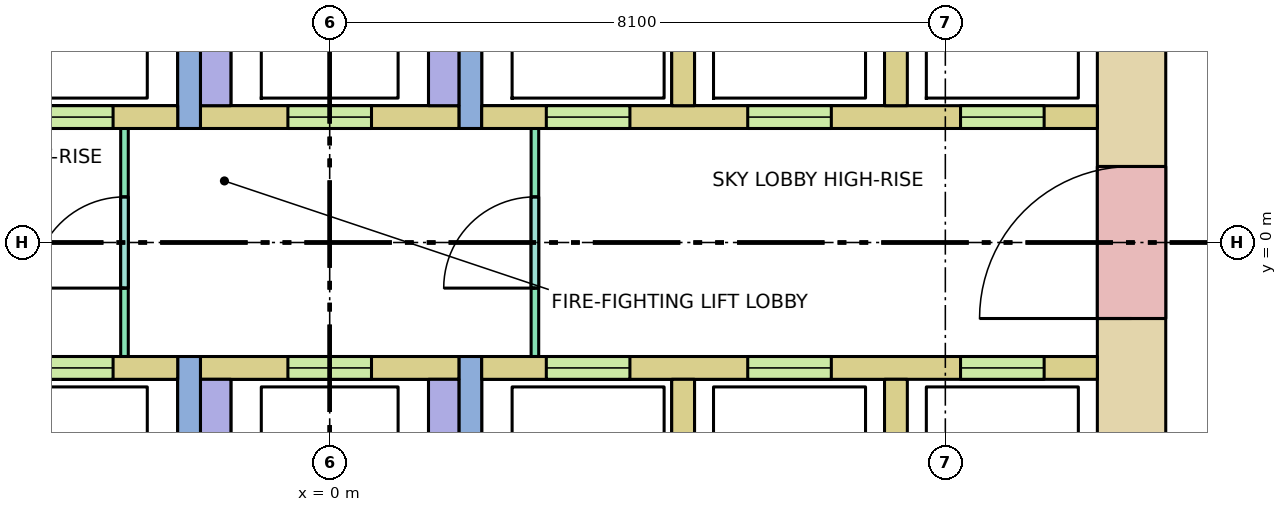
"""IFC4 building model, lengths in metres.
Left out: names, types, materials, properties, quantities, classifications, styles, units other than length and angle.
Written with IfcOpenShell. Run it as: python <this file> out.ifc"""

import sys

from ifc_helpers import new_model, si_unit, direction, frame, frame_2d, origin, place, context, subcontext, project, spatial, rectangle, extrude, element, fill, save


model = new_model("IFC4")
c1 = context("Model", 3, precision=1e-05, world=origin(), true_north=direction((0.0, 1.0)))
c2 = subcontext(c1, "Body", "Model", "MODEL_VIEW")
j1 = project(units=[si_unit("LENGTHUNIT", "METRE"), si_unit("PLANEANGLEUNIT", "RADIAN")], contexts=[c1])
p1 = place(None, origin())
s1 = spatial("IfcSite", under=j1, at=p1, CompositionType="ELEMENT")
p2 = place(p1, origin())
s2 = spatial("IfcBuilding", under=s1, at=p2, CompositionType="ELEMENT")
p3 = place(p2, frame((0.0, 0.0, 146.6)))
s3 = spatial("IfcBuildingStorey", under=s2, at=p3, CompositionType="ELEMENT", Elevation=146.6)
p4 = place(p3, frame((10.55, -5.13, -0.28), z_axis=(0.0, 0.0, 1.0), x_axis=(0.0, 1.0, 0.0)))
e1 = element("IfcWall", 1, at=p4, inside=s3, PredefinedType="SHEAR", context=c2, shape_type="SweptSolid", body=[
    extrude(rectangle(XDim=10.26, YDim=0.9, at=frame_2d((5.13, 0.0))), origin(), (0.0, 0.0, 1.0), 7.6),
])
p5 = place(p4, frame((4.13, 0.0, 0.28)))
e2 = element("IfcOpeningElement", 2, at=p5, cuts=e1, PredefinedType="OPENING", context=c2, shape_type="SweptSolid", body=[
    extrude(rectangle(XDim=2.0, YDim=2.1, at=frame_2d((1.0, 1.05))), frame((0.0, 0.46, 0.0), z_axis=(0.0, -1.0, 0.0), x_axis=(1.0, 0.0, 0.0)), (0.0, 0.0, 1.0), 0.92),
])
p6 = place(p3, frame((-10.1, 1.65, 0.0), z_axis=(0.0, 0.0, 1.0), x_axis=(1.0, 0.0, 0.0)))
e3 = element("IfcWall", 3, at=p6, inside=s3, PredefinedType="SOLIDWALL", context=c2, shape_type="SweptSolid", body=[
    extrude(rectangle(XDim=8.1, YDim=0.3, at=frame_2d((4.05, 0.0))), origin(), (0.0, 0.0, 1.0), 7.32),
])
p7 = place(p6, frame((0.7, 0.0, 0.0)))
e4 = element("IfcOpeningElement", 4, at=p7, cuts=e3, PredefinedType="OPENING", context=c2, shape_type="SweptSolid", body=[
    extrude(rectangle(XDim=1.1, YDim=2.1, at=frame_2d((0.55, 1.05))), frame((0.0, 0.16, 0.0), z_axis=(0.0, -1.0, 0.0), x_axis=(1.0, 0.0, 0.0)), (0.0, 0.0, 1.0), 0.32),
])
p8 = place(p6, frame((3.5, 0.0, 0.0)))
e5 = element("IfcOpeningElement", 5, at=p8, cuts=e3, PredefinedType="OPENING", context=c2, shape_type="SweptSolid", body=[
    extrude(rectangle(XDim=1.1, YDim=2.1, at=frame_2d((0.55, 1.05))), frame((0.0, 0.16, 0.0), z_axis=(0.0, -1.0, 0.0), x_axis=(1.0, 0.0, 0.0)), (0.0, 0.0, 1.0), 0.32),
])
p9 = place(p6, frame((6.15, 0.0, 0.0)))
e6 = element("IfcOpeningElement", 6, at=p9, cuts=e3, PredefinedType="OPENING", context=c2, shape_type="SweptSolid", body=[
    extrude(rectangle(XDim=1.1, YDim=2.1, at=frame_2d((0.55, 1.05))), frame((0.0, 0.16, 0.0), z_axis=(0.0, -1.0, 0.0), x_axis=(1.0, 0.0, 0.0)), (0.0, 0.0, 1.0), 0.32),
])
p10 = place(p3, frame((-10.1, -1.65, 0.0), z_axis=(0.0, 0.0, 1.0), x_axis=(1.0, 0.0, 0.0)))
e7 = element("IfcWall", 7, at=p10, inside=s3, PredefinedType="SOLIDWALL", context=c2, shape_type="SweptSolid", body=[
    extrude(rectangle(XDim=8.1, YDim=0.3, at=frame_2d((4.05, 0.0))), origin(), (0.0, 0.0, 1.0), 7.32),
])
p11 = place(p10, frame((0.7, 0.0, 0.0)))
e8 = element("IfcOpeningElement", 8, at=p11, cuts=e7, PredefinedType="OPENING", context=c2, shape_type="SweptSolid", body=[
    extrude(rectangle(XDim=1.1, YDim=2.1, at=frame_2d((0.55, 1.05))), frame((0.0, 0.16, 0.0), z_axis=(0.0, -1.0, 0.0), x_axis=(1.0, 0.0, 0.0)), (0.0, 0.0, 1.0), 0.32),
])
p12 = place(p10, frame((3.5, 0.0, 0.0)))
e9 = element("IfcOpeningElement", 9, at=p12, cuts=e7, PredefinedType="OPENING", context=c2, shape_type="SweptSolid", body=[
    extrude(rectangle(XDim=1.1, YDim=2.1, at=frame_2d((0.55, 1.05))), frame((0.0, 0.16, 0.0), z_axis=(0.0, -1.0, 0.0), x_axis=(1.0, 0.0, 0.0)), (0.0, 0.0, 1.0), 0.32),
])
p13 = place(p10, frame((6.15, 0.0, 0.0)))
e10 = element("IfcOpeningElement", 10, at=p13, cuts=e7, PredefinedType="OPENING", context=c2, shape_type="SweptSolid", body=[
    extrude(rectangle(XDim=1.1, YDim=2.1, at=frame_2d((0.55, 1.05))), frame((0.0, 0.16, 0.0), z_axis=(0.0, -1.0, 0.0), x_axis=(1.0, 0.0, 0.0)), (0.0, 0.0, 1.0), 0.32),
])
p14 = place(p3, frame((2.0, 1.65, 0.0), z_axis=(0.0, 0.0, 1.0), x_axis=(1.0, 0.0, 0.0)))
e11 = element("IfcWall", 11, at=p14, inside=s3, PredefinedType="SOLIDWALL", context=c2, shape_type="SweptSolid", body=[
    extrude(rectangle(XDim=8.1, YDim=0.3, at=frame_2d((4.05, 0.0))), origin(), (0.0, 0.0, 1.0), 7.32),
])
p15 = place(p14, frame((0.85, 0.0, 0.0)))
e12 = element("IfcOpeningElement", 12, at=p15, cuts=e11, PredefinedType="OPENING", context=c2, shape_type="SweptSolid", body=[
    extrude(rectangle(XDim=1.1, YDim=2.1, at=frame_2d((0.55, 1.05))), frame((0.0, 0.16, 0.0), z_axis=(0.0, -1.0, 0.0), x_axis=(1.0, 0.0, 0.0)), (0.0, 0.0, 1.0), 0.32),
])
p16 = place(p14, frame((3.5, 0.0, 0.0)))
e13 = element("IfcOpeningElement", 13, at=p16, cuts=e11, PredefinedType="OPENING", context=c2, shape_type="SweptSolid", body=[
    extrude(rectangle(XDim=1.1, YDim=2.1, at=frame_2d((0.55, 1.05))), frame((0.0, 0.16, 0.0), z_axis=(0.0, -1.0, 0.0), x_axis=(1.0, 0.0, 0.0)), (0.0, 0.0, 1.0), 0.32),
])
p17 = place(p14, frame((6.3, 0.0, 0.0)))
e14 = element("IfcOpeningElement", 14, at=p17, cuts=e11, PredefinedType="OPENING", context=c2, shape_type="SweptSolid", body=[
    extrude(rectangle(XDim=1.1, YDim=2.1, at=frame_2d((0.55, 1.05))), frame((0.0, 0.16, 0.0), z_axis=(0.0, -1.0, 0.0), x_axis=(1.0, 0.0, 0.0)), (0.0, 0.0, 1.0), 0.32),
])
p18 = place(p3, frame((2.0, -1.65, 0.0), z_axis=(0.0, 0.0, 1.0), x_axis=(1.0, 0.0, 0.0)))
e15 = element("IfcWall", 15, at=p18, inside=s3, PredefinedType="SOLIDWALL", context=c2, shape_type="SweptSolid", body=[
    extrude(rectangle(XDim=8.1, YDim=0.3, at=frame_2d((4.05, 0.0))), origin(), (0.0, 0.0, 1.0), 7.32),
])
p19 = place(p18, frame((0.85, 0.0, 0.0)))
e16 = element("IfcOpeningElement", 16, at=p19, cuts=e15, PredefinedType="OPENING", context=c2, shape_type="SweptSolid", body=[
    extrude(rectangle(XDim=1.1, YDim=2.1, at=frame_2d((0.55, 1.05))), frame((0.0, 0.16, 0.0), z_axis=(0.0, -1.0, 0.0), x_axis=(1.0, 0.0, 0.0)), (0.0, 0.0, 1.0), 0.32),
])
p20 = place(p18, frame((3.5, 0.0, 0.0)))
e17 = element("IfcOpeningElement", 17, at=p20, cuts=e15, PredefinedType="OPENING", context=c2, shape_type="SweptSolid", body=[
    extrude(rectangle(XDim=1.1, YDim=2.1, at=frame_2d((0.55, 1.05))), frame((0.0, 0.16, 0.0), z_axis=(0.0, -1.0, 0.0), x_axis=(1.0, 0.0, 0.0)), (0.0, 0.0, 1.0), 0.32),
])
p21 = place(p18, frame((6.3, 0.0, 0.0)))
e18 = element("IfcOpeningElement", 18, at=p21, cuts=e15, PredefinedType="OPENING", context=c2, shape_type="SweptSolid", body=[
    extrude(rectangle(XDim=1.1, YDim=2.1, at=frame_2d((0.55, 1.05))), frame((0.0, 0.16, 0.0), z_axis=(0.0, -1.0, 0.0), x_axis=(1.0, 0.0, 0.0)), (0.0, 0.0, 1.0), 0.32),
])
for number, where, z_axis, x_axis in (
    (19, (4.65, 1.8, 0.0), (0.0, 0.0, 1.0), (0.0, 1.0, 0.0)),
    (20, (4.65, -4.2, 0.0), (0.0, 0.0, 1.0), (0.0, 1.0, 0.0)),
    (21, (7.45, 1.8, 0.0), (0.0, 0.0, 1.0), (0.0, 1.0, 0.0)),
    (22, (7.45, -4.2, 0.0), (0.0, 0.0, 1.0), (0.0, 1.0, 0.0)),
):
    element("IfcWall", number, at=place(p3, frame(where, z_axis=z_axis, x_axis=x_axis)), inside=s3, PredefinedType="SOLIDWALL", context=c2, shape_type="SweptSolid", body=[
        extrude(rectangle(XDim=2.4, YDim=0.3, at=frame_2d((1.2, 0.0))), origin(), (0.0, 0.0, 1.0), 7.32),
    ])
for number, where, z_axis, x_axis in (
    (23, (-1.85, 1.5, 0.0), (0.0, 0.0, 1.0), (0.0, 1.0, 0.0)),
    (24, (-1.85, -8.1, 0.0), (0.0, 0.0, 1.0), (0.0, 1.0, 0.0)),
    (25, (1.85, 1.5, 0.0), (0.0, 0.0, 1.0), (0.0, 1.0, 0.0)),
    (26, (1.85, -8.1, 0.0), (0.0, 0.0, 1.0), (0.0, 1.0, 0.0)),
):
    element("IfcWall", number, at=place(p3, frame(where, z_axis=z_axis, x_axis=x_axis)), inside=s3, PredefinedType="SHEAR", context=c2, shape_type="SweptSolid", body=[
        extrude(rectangle(XDim=6.6, YDim=0.3, at=frame_2d((3.3, 0.0))), origin(), (0.0, 0.0, 1.0), 7.32),
    ])
p22 = place(p3, frame((-1.7, 1.65, 0.0), z_axis=(0.0, 0.0, 1.0), x_axis=(1.0, 0.0, 0.0)))
e27 = element("IfcWall", 27, at=p22, inside=s3, PredefinedType="SOLIDWALL", context=c2, shape_type="SweptSolid", body=[
    extrude(rectangle(XDim=3.4, YDim=0.3, at=frame_2d((1.7, 0.0))), origin(), (0.0, 0.0, 1.0), 7.32),
])
p23 = place(p22, frame((1.15, 0.0, 0.0)))
e28 = element("IfcOpeningElement", 28, at=p23, cuts=e27, PredefinedType="OPENING", context=c2, shape_type="SweptSolid", body=[
    extrude(rectangle(XDim=1.1, YDim=2.1, at=frame_2d((0.55, 1.05))), frame((0.0, 0.16, 0.0), z_axis=(0.0, -1.0, 0.0), x_axis=(1.0, 0.0, 0.0)), (0.0, 0.0, 1.0), 0.32),
])
p24 = place(p3, frame((-1.7, -1.65, 0.0), z_axis=(0.0, 0.0, 1.0), x_axis=(1.0, 0.0, 0.0)))
e29 = element("IfcWall", 29, at=p24, inside=s3, PredefinedType="SOLIDWALL", context=c2, shape_type="SweptSolid", body=[
    extrude(rectangle(XDim=3.4, YDim=0.3, at=frame_2d((1.7, 0.0))), origin(), (0.0, 0.0, 1.0), 7.32),
])
p25 = place(p24, frame((1.15, 0.0, 0.0)))
e30 = element("IfcOpeningElement", 30, at=p25, cuts=e29, PredefinedType="OPENING", context=c2, shape_type="SweptSolid", body=[
    extrude(rectangle(XDim=1.1, YDim=2.1, at=frame_2d((0.55, 1.05))), frame((0.0, 0.16, 0.0), z_axis=(0.0, -1.0, 0.0), x_axis=(1.0, 0.0, 0.0)), (0.0, 0.0, 1.0), 0.32),
])
for number, where, z_axis, x_axis in (
    (31, (-1.5, 1.8, 0.0), (0.0, 0.0, 1.0), (0.0, 1.0, 0.0)),
    (32, (-1.5, -4.8, 0.0), (0.0, 0.0, 1.0), (0.0, 1.0, 0.0)),
    (33, (1.5, 1.8, 0.0), (0.0, 0.0, 1.0), (0.0, 1.0, 0.0)),
    (34, (1.5, -4.8, 0.0), (0.0, 0.0, 1.0), (0.0, 1.0, 0.0)),
):
    element("IfcWall", number, at=place(p3, frame(where, z_axis=z_axis, x_axis=x_axis)), inside=s3, PredefinedType="SOLIDWALL", context=c2, shape_type="SweptSolid", body=[
        extrude(rectangle(XDim=3.0, YDim=0.4, at=frame_2d((1.5, 0.0))), origin(), (0.0, 0.0, 1.0), 7.32),
    ])
p26 = place(p3, frame((-2.7, -1.5, 0.0), z_axis=(0.0, 0.0, 1.0), x_axis=(0.0, 1.0, 0.0)))
e35 = element("IfcWall", 35, at=p26, inside=s3, PredefinedType="PARTITIONING", context=c2, shape_type="SweptSolid", body=[
    extrude(rectangle(XDim=3.0, YDim=0.1, at=frame_2d((1.5, 0.0))), origin(), (0.0, 0.0, 1.0), 7.32),
])
p27 = place(p26, frame((0.9, 0.0, 0.0)))
e36 = element("IfcOpeningElement", 36, at=p27, cuts=e35, PredefinedType="OPENING", context=c2, shape_type="SweptSolid", body=[
    extrude(rectangle(XDim=1.2, YDim=2.1, at=frame_2d((0.6, 1.05))), frame((0.0, 0.06, 0.0), z_axis=(0.0, -1.0, 0.0), x_axis=(1.0, 0.0, 0.0)), (0.0, 0.0, 1.0), 0.12),
])
p28 = place(p3, frame((2.7, -1.5, 0.0), z_axis=(0.0, 0.0, 1.0), x_axis=(0.0, 1.0, 0.0)))
e37 = element("IfcWall", 37, at=p28, inside=s3, PredefinedType="PARTITIONING", context=c2, shape_type="SweptSolid", body=[
    extrude(rectangle(XDim=3.0, YDim=0.1, at=frame_2d((1.5, 0.0))), origin(), (0.0, 0.0, 1.0), 7.32),
])
p29 = place(p28, frame((0.9, 0.0, 0.0)))
e38 = element("IfcOpeningElement", 38, at=p29, cuts=e37, PredefinedType="OPENING", context=c2, shape_type="SweptSolid", body=[
    extrude(rectangle(XDim=1.2, YDim=2.1, at=frame_2d((0.6, 1.05))), frame((0.0, 0.06, 0.0), z_axis=(0.0, -1.0, 0.0), x_axis=(1.0, 0.0, 0.0)), (0.0, 0.0, 1.0), 0.12),
])
p30 = place(p9, origin())
e39 = element("IfcDoor", 39, at=p30, inside=s3, OperationType="DOUBLE_DOOR_SLIDING", PredefinedType="DOOR", context=c2, shape_type="SweptSolid", body=[
    extrude(rectangle(XDim=1.1, YDim=2.1, at=frame_2d((0.55, 1.05))), frame((0.0, 0.025, 0.0), z_axis=(0.0, -1.0, 0.0), x_axis=(1.0, 0.0, 0.0)), (0.0, 0.0, 1.0), 0.05),
])
fill(e6, e39)
p31 = place(p13, origin())
e40 = element("IfcDoor", 40, at=p31, inside=s3, OperationType="DOUBLE_DOOR_SLIDING", PredefinedType="DOOR", context=c2, shape_type="SweptSolid", body=[
    extrude(rectangle(XDim=1.1, YDim=2.1, at=frame_2d((0.55, 1.05))), frame((0.0, 0.025, 0.0), z_axis=(0.0, -1.0, 0.0), x_axis=(1.0, 0.0, 0.0)), (0.0, 0.0, 1.0), 0.05),
])
fill(e10, e40)
p32 = place(p15, origin())
e41 = element("IfcDoor", 41, at=p32, inside=s3, OperationType="DOUBLE_DOOR_SLIDING", PredefinedType="DOOR", context=c2, shape_type="SweptSolid", body=[
    extrude(rectangle(XDim=1.1, YDim=2.1, at=frame_2d((0.55, 1.05))), frame((0.0, 0.025, 0.0), z_axis=(0.0, -1.0, 0.0), x_axis=(1.0, 0.0, 0.0)), (0.0, 0.0, 1.0), 0.05),
])
fill(e12, e41)
p33 = place(p16, origin())
e42 = element("IfcDoor", 42, at=p33, inside=s3, OperationType="DOUBLE_DOOR_SLIDING", PredefinedType="DOOR", context=c2, shape_type="SweptSolid", body=[
    extrude(rectangle(XDim=1.1, YDim=2.1, at=frame_2d((0.55, 1.05))), frame((0.0, 0.025, 0.0), z_axis=(0.0, -1.0, 0.0), x_axis=(1.0, 0.0, 0.0)), (0.0, 0.0, 1.0), 0.05),
])
fill(e13, e42)
p34 = place(p17, origin())
e43 = element("IfcDoor", 43, at=p34, inside=s3, OperationType="DOUBLE_DOOR_SLIDING", PredefinedType="DOOR", context=c2, shape_type="SweptSolid", body=[
    extrude(rectangle(XDim=1.1, YDim=2.1, at=frame_2d((0.55, 1.05))), frame((0.0, 0.025, 0.0), z_axis=(0.0, -1.0, 0.0), x_axis=(1.0, 0.0, 0.0)), (0.0, 0.0, 1.0), 0.05),
])
fill(e14, e43)
p35 = place(p19, origin())
e44 = element("IfcDoor", 44, at=p35, inside=s3, OperationType="DOUBLE_DOOR_SLIDING", PredefinedType="DOOR", context=c2, shape_type="SweptSolid", body=[
    extrude(rectangle(XDim=1.1, YDim=2.1, at=frame_2d((0.55, 1.05))), frame((0.0, 0.025, 0.0), z_axis=(0.0, -1.0, 0.0), x_axis=(1.0, 0.0, 0.0)), (0.0, 0.0, 1.0), 0.05),
])
fill(e16, e44)
p36 = place(p20, origin())
e45 = element("IfcDoor", 45, at=p36, inside=s3, OperationType="DOUBLE_DOOR_SLIDING", PredefinedType="DOOR", context=c2, shape_type="SweptSolid", body=[
    extrude(rectangle(XDim=1.1, YDim=2.1, at=frame_2d((0.55, 1.05))), frame((0.0, 0.025, 0.0), z_axis=(0.0, -1.0, 0.0), x_axis=(1.0, 0.0, 0.0)), (0.0, 0.0, 1.0), 0.05),
])
fill(e17, e45)
p37 = place(p21, origin())
e46 = element("IfcDoor", 46, at=p37, inside=s3, OperationType="DOUBLE_DOOR_SLIDING", PredefinedType="DOOR", context=c2, shape_type="SweptSolid", body=[
    extrude(rectangle(XDim=1.1, YDim=2.1, at=frame_2d((0.55, 1.05))), frame((0.0, 0.025, 0.0), z_axis=(0.0, -1.0, 0.0), x_axis=(1.0, 0.0, 0.0)), (0.0, 0.0, 1.0), 0.05),
])
fill(e18, e46)
p38 = place(p23, origin())
e47 = element("IfcDoor", 47, at=p38, inside=s3, OperationType="DOUBLE_DOOR_SLIDING", PredefinedType="DOOR", context=c2, shape_type="SweptSolid", body=[
    extrude(rectangle(XDim=1.1, YDim=2.1, at=frame_2d((0.55, 1.05))), frame((0.0, 0.025, 0.0), z_axis=(0.0, -1.0, 0.0), x_axis=(1.0, 0.0, 0.0)), (0.0, 0.0, 1.0), 0.05),
])
fill(e28, e47)
p39 = place(p25, origin())
e48 = element("IfcDoor", 48, at=p39, inside=s3, OperationType="DOUBLE_DOOR_SLIDING", PredefinedType="DOOR", context=c2, shape_type="SweptSolid", body=[
    extrude(rectangle(XDim=1.1, YDim=2.1, at=frame_2d((0.55, 1.05))), frame((0.0, 0.025, 0.0), z_axis=(0.0, -1.0, 0.0), x_axis=(1.0, 0.0, 0.0)), (0.0, 0.0, 1.0), 0.05),
])
fill(e30, e48)
p40 = place(p5, origin())
e49 = element("IfcDoor", 49, at=p40, inside=s3, OperationType="DOUBLE_DOOR_SINGLE_SWING", PredefinedType="DOOR", context=c2, shape_type="SweptSolid", body=[
    extrude(rectangle(XDim=2.0, YDim=2.1, at=frame_2d((1.0, 1.05))), frame((0.0, 0.025, 0.0), z_axis=(0.0, -1.0, 0.0), x_axis=(1.0, 0.0, 0.0)), (0.0, 0.0, 1.0), 0.05),
])
fill(e2, e49)
p41 = place(p27, origin())
e50 = element("IfcDoor", 50, at=p41, inside=s3, OperationType="SINGLE_SWING_LEFT", PredefinedType="DOOR", context=c2, shape_type="SweptSolid", body=[
    extrude(rectangle(XDim=1.2, YDim=2.1, at=frame_2d((0.6, 1.05))), frame((0.0, 0.025, 0.0), z_axis=(0.0, -1.0, 0.0), x_axis=(1.0, 0.0, 0.0)), (0.0, 0.0, 1.0), 0.05),
])
fill(e36, e50)
p42 = place(p29, origin())
e51 = element("IfcDoor", 51, at=p42, inside=s3, OperationType="SINGLE_SWING_LEFT", PredefinedType="DOOR", context=c2, shape_type="SweptSolid", body=[
    extrude(rectangle(XDim=1.2, YDim=2.1, at=frame_2d((0.6, 1.05))), frame((0.0, 0.025, 0.0), z_axis=(0.0, -1.0, 0.0), x_axis=(1.0, 0.0, 0.0)), (0.0, 0.0, 1.0), 0.05),
])
fill(e38, e51)
save(model, sys.argv[1])
